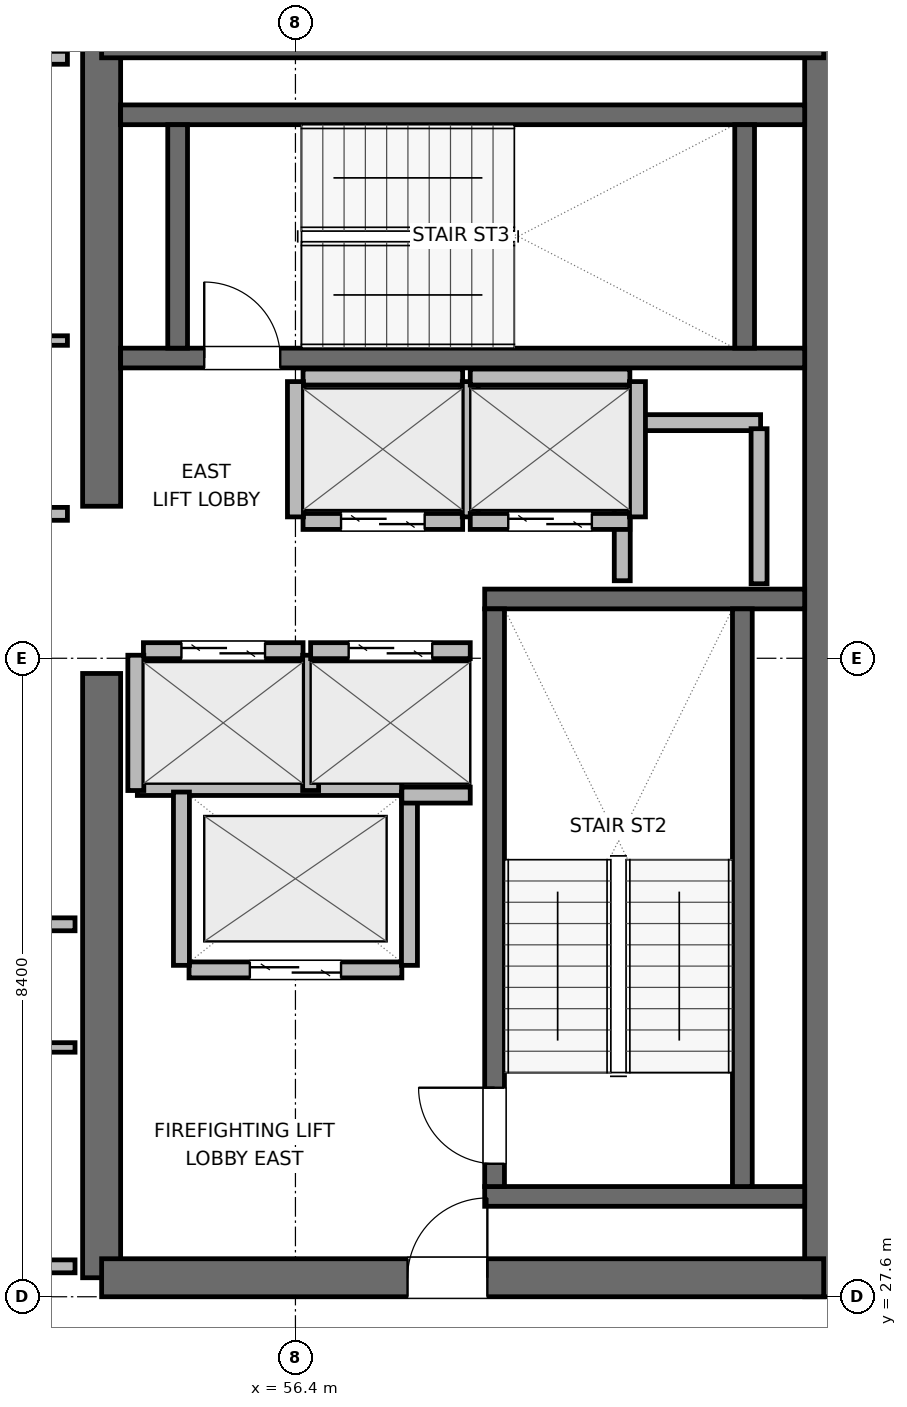
"""IFC4 building model, lengths in metres.
Left out: names, types, materials, properties, quantities, classifications, styles, units other than length and angle.
Written with IfcOpenShell. Run it as: python <this file> out.ifc"""

import sys

from ifc_helpers import new_model, si_unit, direction, frame, frame_2d, origin, place, context, subcontext, project, spatial, rectangle, extrude, element, fill, save


model = new_model("IFC4")
c1 = context("Model", 3, precision=1e-05, world=origin(), true_north=direction((0.0, 1.0)))
c2 = subcontext(c1, "Body", "Model", "MODEL_VIEW")
j1 = project(units=[si_unit("LENGTHUNIT", "METRE"), si_unit("PLANEANGLEUNIT", "RADIAN")], contexts=[c1])
p1 = place(None, origin())
s1 = spatial("IfcSite", under=j1, at=p1, CompositionType="ELEMENT")
p2 = place(p1, origin())
s2 = spatial("IfcBuilding", under=s1, at=p2, CompositionType="ELEMENT")
p3 = place(p2, frame((0.0, 0.0, 278.4)))
s3 = spatial("IfcBuildingStorey", under=s2, at=p3, CompositionType="ELEMENT", Elevation=278.4)
p4 = place(p3, frame((53.85, 27.85, 0.0), z_axis=(0.0, 0.0, 1.0), x_axis=(0.0, 1.0, 0.0)))
e1 = element("IfcWall", 1, at=p4, inside=s3, PredefinedType="SHEAR", context=c2, shape_type="SweptSolid", body=[
    extrude(rectangle(XDim=7.95, YDim=0.5, at=frame_2d((3.975, 0.0))), origin(), (0.0, 0.0, 1.0), 3.9),
])
p5 = place(p3, frame((53.85, 38.0, 0.0), z_axis=(0.0, 0.0, 1.0), x_axis=(0.0, 1.0, 0.0)))
e2 = element("IfcWall", 2, at=p5, inside=s3, PredefinedType="SHEAR", context=c2, shape_type="SweptSolid", body=[
    extrude(rectangle(XDim=6.15, YDim=0.5, at=frame_2d((3.075, 0.0))), origin(), (0.0, 0.0, 1.0), 3.9),
])
p6 = place(p3, frame((63.35, 27.6, 0.0), z_axis=(0.0, 0.0, 1.0), x_axis=(0.0, 1.0, 0.0)))
e3 = element("IfcWall", 3, at=p6, inside=s3, PredefinedType="SHEAR", context=c2, shape_type="SweptSolid", body=[
    extrude(rectangle(XDim=16.8, YDim=0.5, at=frame_2d((8.4, 0.0))), origin(), (0.0, 0.0, 1.0), 3.9),
])
p7 = place(p3, frame((53.85, 27.85, 0.0), z_axis=(0.0, 0.0, 1.0), x_axis=(1.0, 0.0, 0.0)))
e4 = element("IfcWall", 4, at=p7, inside=s3, PredefinedType="SHEAR", context=c2, shape_type="SweptSolid", body=[
    extrude(rectangle(XDim=9.5, YDim=0.5, at=frame_2d((4.75, 0.0))), origin(), (0.0, 0.0, 1.0), 3.9),
])
p8 = place(p7, frame((4.025, 0.0, 0.0)))
e5 = element("IfcOpeningElement", 5, at=p8, cuts=e4, PredefinedType="OPENING", context=c2, shape_type="SweptSolid", body=[
    extrude(rectangle(XDim=1.05, YDim=2.04, at=frame_2d((0.525, 1.02))), frame((0.0, 0.26, 0.0), z_axis=(0.0, -1.0, 0.0), x_axis=(1.0, 0.0, 0.0)), (0.0, 0.0, 1.0), 0.52),
])
p9 = place(p3, frame((53.85, 44.15, 0.0), z_axis=(0.0, 0.0, 1.0), x_axis=(1.0, 0.0, 0.0)))
e6 = element("IfcWall", 6, at=p9, inside=s3, PredefinedType="SHEAR", context=c2, shape_type="SweptSolid", body=[
    extrude(rectangle(XDim=9.5, YDim=0.5, at=frame_2d((4.75, 0.0))), origin(), (0.0, 0.0, 1.0), 3.9),
])
for number, where, z_axis, x_axis in (
    (7, (58.89, 28.92, 0.0), (0.0, 0.0, 1.0), (1.0, 0.0, 0.0)),
    (8, (58.89, 36.78, 0.0), (0.0, 0.0, 1.0), (1.0, 0.0, 0.0)),
):
    element("IfcWall", number, at=place(p3, frame(where, z_axis=z_axis, x_axis=x_axis)), inside=s3, PredefinedType="SHEAR", context=c2, shape_type="SweptSolid", body=[
        extrude(rectangle(XDim=4.21, YDim=0.26, at=frame_2d((2.105, 0.0))), origin(), (0.0, 0.0, 1.0), 3.9),
    ])
p10 = place(p3, frame((59.02, 29.05, 0.0), z_axis=(0.0, 0.0, 1.0), x_axis=(0.0, 1.0, 0.0)))
e9 = element("IfcWall", 9, at=p10, inside=s3, PredefinedType="SHEAR", context=c2, shape_type="SweptSolid", body=[
    extrude(rectangle(XDim=7.6, YDim=0.26, at=frame_2d((3.8, 0.0))), origin(), (0.0, 0.0, 1.0), 3.9),
])
p11 = place(p10, frame((0.3, 0.0, 0.0)))
e10 = element("IfcOpeningElement", 10, at=p11, cuts=e9, PredefinedType="OPENING", context=c2, shape_type="SweptSolid", body=[
    extrude(rectangle(XDim=1.0, YDim=2.04, at=frame_2d((0.5, 1.02))), frame((0.0, 0.14, 0.0), z_axis=(0.0, -1.0, 0.0), x_axis=(1.0, 0.0, 0.0)), (0.0, 0.0, 1.0), 0.28),
])
p12 = place(p3, frame((62.28, 29.05, 0.0), z_axis=(0.0, 0.0, 1.0), x_axis=(0.0, 1.0, 0.0)))
e11 = element("IfcWall", 11, at=p12, inside=s3, PredefinedType="SHEAR", context=c2, shape_type="SweptSolid", body=[
    extrude(rectangle(XDim=7.6, YDim=0.26, at=frame_2d((3.8, 0.0))), origin(), (0.0, 0.0, 1.0), 3.9),
])
p13 = place(p3, frame((54.1, 39.95, 0.0), z_axis=(0.0, 0.0, 1.0), x_axis=(1.0, 0.0, 0.0)))
e12 = element("IfcWall", 12, at=p13, inside=s3, PredefinedType="SHEAR", context=c2, shape_type="SweptSolid", body=[
    extrude(rectangle(XDim=9.0, YDim=0.26, at=frame_2d((4.5, 0.0))), origin(), (0.0, 0.0, 1.0), 3.9),
])
p14 = place(p13, frame((1.1, 0.0, 0.0)))
e13 = element("IfcOpeningElement", 13, at=p14, cuts=e12, PredefinedType="OPENING", context=c2, shape_type="SweptSolid", body=[
    extrude(rectangle(XDim=1.0, YDim=2.04, at=frame_2d((0.5, 1.02))), frame((0.0, 0.14, 0.0), z_axis=(0.0, -1.0, 0.0), x_axis=(1.0, 0.0, 0.0)), (0.0, 0.0, 1.0), 0.28),
])
p15 = place(p3, frame((54.1, 43.15, 0.0), z_axis=(0.0, 0.0, 1.0), x_axis=(1.0, 0.0, 0.0)))
e14 = element("IfcWall", 14, at=p15, inside=s3, PredefinedType="SHEAR", context=c2, shape_type="SweptSolid", body=[
    extrude(rectangle(XDim=9.0, YDim=0.26, at=frame_2d((4.5, 0.0))), origin(), (0.0, 0.0, 1.0), 3.9),
])
for number, where, z_axis, x_axis in (
    (15, (54.85, 40.08, 0.0), (0.0, 0.0, 1.0), (0.0, 1.0, 0.0)),
    (16, (62.31, 40.08, 0.0), (0.0, 0.0, 1.0), (0.0, 1.0, 0.0)),
):
    element("IfcWall", number, at=place(p3, frame(where, z_axis=z_axis, x_axis=x_axis)), inside=s3, PredefinedType="SHEAR", context=c2, shape_type="SweptSolid", body=[
        extrude(rectangle(XDim=2.94, YDim=0.26, at=frame_2d((1.47, 0.0))), origin(), (0.0, 0.0, 1.0), 3.9),
    ])
p16 = place(p3, frame((60.72, 39.1, 0.0), z_axis=(0.0, 0.0, 1.0), x_axis=(1.0, 0.0, 0.0)))
e17 = element("IfcWall", 17, at=p16, inside=s3, PredefinedType="PARTITIONING", context=c2, shape_type="SweptSolid", body=[
    extrude(rectangle(XDim=1.8, YDim=0.21, at=frame_2d((0.9, 0.0))), origin(), (0.0, 0.0, 1.0), 3.6),
])
p17 = place(p3, frame((60.7, 37.02, 0.0), z_axis=(0.0, 0.0, 1.0), x_axis=(0.0, 1.0, 0.0)))
e18 = element("IfcWall", 18, at=p17, inside=s3, PredefinedType="PARTITIONING", context=c2, shape_type="SweptSolid", body=[
    extrude(rectangle(XDim=1.96, YDim=0.21, at=frame_2d((0.98, 0.0))), origin(), (0.0, 0.0, 1.0), 3.6),
])
p18 = place(p3, frame((62.5, 36.98, 0.0), z_axis=(0.0, 0.0, 1.0), x_axis=(0.0, 1.0, 0.0)))
e19 = element("IfcWall", 19, at=p18, inside=s3, PredefinedType="PARTITIONING", context=c2, shape_type="SweptSolid", body=[
    extrude(rectangle(XDim=2.04, YDim=0.21, at=frame_2d((1.02, 0.0))), origin(), (0.0, 0.0, 1.0), 3.6),
])
p19 = place(p3, frame((55.0, 31.9, 0.0), z_axis=(0.0, 0.0, 1.0), x_axis=(1.0, 0.0, 0.0)))
e20 = element("IfcWall", 20, at=p19, inside=s3, PredefinedType="PARTITIONING", context=c2, shape_type="SweptSolid", body=[
    extrude(rectangle(XDim=2.8, YDim=0.21, at=frame_2d((1.4, 0.0))), origin(), (0.0, 0.0, 1.0), 3.6),
])
p20 = place(p19, frame((0.8, 0.0, 0.0)))
e21 = element("IfcOpeningElement", 21, at=p20, cuts=e20, PredefinedType="OPENING", context=c2, shape_type="SweptSolid", body=[
    extrude(rectangle(XDim=1.2, YDim=2.04, at=frame_2d((0.6, 1.02))), frame((0.0, 0.115, 0.0), z_axis=(0.0, -1.0, 0.0), x_axis=(1.0, 0.0, 0.0)), (0.0, 0.0, 1.0), 0.23),
])
p21 = place(p3, frame((54.32, 34.3, 0.0), z_axis=(0.0, 0.0, 1.0), x_axis=(1.0, 0.0, 0.0)))
e22 = element("IfcWall", 22, at=p21, inside=s3, PredefinedType="PARTITIONING", context=c2, shape_type="SweptSolid", body=[
    extrude(rectangle(XDim=3.48, YDim=0.21, at=frame_2d((1.74, 0.0))), origin(), (0.0, 0.0, 1.0), 3.6),
])
for number, where, z_axis, x_axis in (
    (23, (54.9, 31.96, 0.0), (0.0, 0.0, 1.0), (0.0, 1.0, 0.0)),
    (24, (57.9, 31.96, 0.0), (0.0, 0.0, 1.0), (0.0, 1.0, 0.0)),
):
    element("IfcWall", number, at=place(p3, frame(where, z_axis=z_axis, x_axis=x_axis)), inside=s3, PredefinedType="PARTITIONING", context=c2, shape_type="SweptSolid", body=[
        extrude(rectangle(XDim=2.28, YDim=0.21, at=frame_2d((1.14, 0.0))), origin(), (0.0, 0.0, 1.0), 3.6),
    ])
p22 = place(p3, frame((54.4, 36.1, 0.0), z_axis=(0.0, 0.0, 1.0), x_axis=(1.0, 0.0, 0.0)))
e25 = element("IfcWall", 25, at=p22, inside=s3, PredefinedType="PARTITIONING", context=c2, shape_type="SweptSolid", body=[
    extrude(rectangle(XDim=2.1, YDim=0.21, at=frame_2d((1.05, 0.0))), origin(), (0.0, 0.0, 1.0), 3.6),
])
p23 = place(p22, frame((0.5, 0.0, 0.0)))
e26 = element("IfcOpeningElement", 26, at=p23, cuts=e25, PredefinedType="OPENING", context=c2, shape_type="SweptSolid", body=[
    extrude(rectangle(XDim=1.1, YDim=2.04, at=frame_2d((0.55, 1.02))), frame((0.0, 0.115, 0.0), z_axis=(0.0, -1.0, 0.0), x_axis=(1.0, 0.0, 0.0)), (0.0, 0.0, 1.0), 0.23),
])
for number, where, z_axis, x_axis in (
    (27, (54.3, 34.26, 0.0), (0.0, 0.0, 1.0), (0.0, 1.0, 0.0)),
    (28, (56.6, 34.26, 0.0), (0.0, 0.0, 1.0), (0.0, 1.0, 0.0)),
):
    element("IfcWall", number, at=place(p3, frame(where, z_axis=z_axis, x_axis=x_axis)), inside=s3, PredefinedType="PARTITIONING", context=c2, shape_type="SweptSolid", body=[
        extrude(rectangle(XDim=1.78, YDim=0.21, at=frame_2d((0.89, 0.0))), origin(), (0.0, 0.0, 1.0), 3.6),
    ])
p24 = place(p3, frame((56.6, 36.1, 0.0), z_axis=(0.0, 0.0, 1.0), x_axis=(1.0, 0.0, 0.0)))
e29 = element("IfcWall", 29, at=p24, inside=s3, PredefinedType="PARTITIONING", context=c2, shape_type="SweptSolid", body=[
    extrude(rectangle(XDim=2.1, YDim=0.21, at=frame_2d((1.05, 0.0))), origin(), (0.0, 0.0, 1.0), 3.6),
])
p25 = place(p24, frame((0.5, 0.0, 0.0)))
e30 = element("IfcOpeningElement", 30, at=p25, cuts=e29, PredefinedType="OPENING", context=c2, shape_type="SweptSolid", body=[
    extrude(rectangle(XDim=1.1, YDim=2.04, at=frame_2d((0.55, 1.02))), frame((0.0, 0.115, 0.0), z_axis=(0.0, -1.0, 0.0), x_axis=(1.0, 0.0, 0.0)), (0.0, 0.0, 1.0), 0.23),
])
p26 = place(p3, frame((57.8, 34.2, 0.0), z_axis=(0.0, 0.0, 1.0), x_axis=(1.0, 0.0, 0.0)))
e31 = element("IfcWall", 31, at=p26, inside=s3, PredefinedType="PARTITIONING", context=c2, shape_type="SweptSolid", body=[
    extrude(rectangle(XDim=0.9, YDim=0.21, at=frame_2d((0.45, 0.0))), origin(), (0.0, 0.0, 1.0), 3.6),
])
p27 = place(p3, frame((56.5, 37.8, 0.0), z_axis=(0.0, 0.0, 1.0), x_axis=(1.0, 0.0, 0.0)))
e32 = element("IfcWall", 32, at=p27, inside=s3, PredefinedType="PARTITIONING", context=c2, shape_type="SweptSolid", body=[
    extrude(rectangle(XDim=2.1, YDim=0.21, at=frame_2d((1.05, 0.0))), origin(), (0.0, 0.0, 1.0), 3.6),
])
p28 = place(p27, frame((0.5, 0.0, 0.0)))
e33 = element("IfcOpeningElement", 33, at=p28, cuts=e32, PredefinedType="OPENING", context=c2, shape_type="SweptSolid", body=[
    extrude(rectangle(XDim=1.1, YDim=2.04, at=frame_2d((0.55, 1.02))), frame((0.0, 0.115, 0.0), z_axis=(0.0, -1.0, 0.0), x_axis=(1.0, 0.0, 0.0)), (0.0, 0.0, 1.0), 0.23),
])
p29 = place(p3, frame((56.5, 39.7, 0.0), z_axis=(0.0, 0.0, 1.0), x_axis=(1.0, 0.0, 0.0)))
e34 = element("IfcWall", 34, at=p29, inside=s3, PredefinedType="PARTITIONING", context=c2, shape_type="SweptSolid", body=[
    extrude(rectangle(XDim=2.1, YDim=0.21, at=frame_2d((1.05, 0.0))), origin(), (0.0, 0.0, 1.0), 3.6),
])
for number, where, z_axis, x_axis in (
    (35, (56.4, 37.86, 0.0), (0.0, 0.0, 1.0), (0.0, 1.0, 0.0)),
    (36, (58.7, 37.86, 0.0), (0.0, 0.0, 1.0), (0.0, 1.0, 0.0)),
):
    element("IfcWall", number, at=place(p3, frame(where, z_axis=z_axis, x_axis=x_axis)), inside=s3, PredefinedType="PARTITIONING", context=c2, shape_type="SweptSolid", body=[
        extrude(rectangle(XDim=1.78, YDim=0.21, at=frame_2d((0.89, 0.0))), origin(), (0.0, 0.0, 1.0), 3.6),
    ])
p30 = place(p3, frame((58.7, 37.8, 0.0), z_axis=(0.0, 0.0, 1.0), x_axis=(1.0, 0.0, 0.0)))
e37 = element("IfcWall", 37, at=p30, inside=s3, PredefinedType="PARTITIONING", context=c2, shape_type="SweptSolid", body=[
    extrude(rectangle(XDim=2.1, YDim=0.21, at=frame_2d((1.05, 0.0))), origin(), (0.0, 0.0, 1.0), 3.6),
])
p31 = place(p30, frame((0.5, 0.0, 0.0)))
e38 = element("IfcOpeningElement", 38, at=p31, cuts=e37, PredefinedType="OPENING", context=c2, shape_type="SweptSolid", body=[
    extrude(rectangle(XDim=1.1, YDim=2.04, at=frame_2d((0.55, 1.02))), frame((0.0, 0.115, 0.0), z_axis=(0.0, -1.0, 0.0), x_axis=(1.0, 0.0, 0.0)), (0.0, 0.0, 1.0), 0.23),
])
p32 = place(p3, frame((58.7, 39.7, 0.0), z_axis=(0.0, 0.0, 1.0), x_axis=(1.0, 0.0, 0.0)))
e39 = element("IfcWall", 39, at=p32, inside=s3, PredefinedType="PARTITIONING", context=c2, shape_type="SweptSolid", body=[
    extrude(rectangle(XDim=2.1, YDim=0.21, at=frame_2d((1.05, 0.0))), origin(), (0.0, 0.0, 1.0), 3.6),
])
p33 = place(p3, frame((60.9, 37.86, 0.0), z_axis=(0.0, 0.0, 1.0), x_axis=(0.0, 1.0, 0.0)))
e40 = element("IfcWall", 40, at=p33, inside=s3, PredefinedType="PARTITIONING", context=c2, shape_type="SweptSolid", body=[
    extrude(rectangle(XDim=1.78, YDim=0.21, at=frame_2d((0.89, 0.0))), origin(), (0.0, 0.0, 1.0), 3.6),
])
p34 = place(p3, frame((49.287, 28.0, 0.0), z_axis=(0.0, 0.0, 1.0), x_axis=(1.0, 0.0, 0.0)))
e41 = element("IfcWall", 41, at=p34, inside=s3, PredefinedType="PARTITIONING", context=c2, shape_type="SweptSolid", body=[
    extrude(rectangle(XDim=4.213, YDim=0.17, at=frame_2d((2.106, 0.0))), origin(), (0.0, 0.0, 1.0), 2.685),
])
p35 = place(p3, frame((52.2, 32.5, 0.0), z_axis=(0.0, 0.0, 1.0), x_axis=(1.0, 0.0, 0.0)))
e42 = element("IfcWall", 42, at=p35, inside=s3, PredefinedType="PARTITIONING", context=c2, shape_type="SweptSolid", body=[
    extrude(rectangle(XDim=1.3, YDim=0.17, at=frame_2d((0.65, 0.0))), origin(), (0.0, 0.0, 1.0), 3.6),
])
p36 = place(p3, frame((49.287, 30.88, 0.0), z_axis=(0.0, 0.0, 1.0), x_axis=(1.0, 0.0, 0.0)))
e43 = element("IfcWall", 43, at=p36, inside=s3, PredefinedType="PARTITIONING", context=c2, shape_type="SweptSolid", body=[
    extrude(rectangle(XDim=4.213, YDim=0.125, at=frame_2d((2.106, 0.0))), origin(), (0.0, 0.0, 1.0), 3.6),
])
p37 = place(p3, frame((49.287, 37.9, 0.0), z_axis=(0.0, 0.0, 1.0), x_axis=(1.0, 0.0, 0.0)))
e44 = element("IfcWall", 44, at=p37, inside=s3, PredefinedType="PARTITIONING", context=c2, shape_type="SweptSolid", body=[
    extrude(rectangle(XDim=4.113, YDim=0.17, at=frame_2d((2.056, 0.0))), origin(), (0.0, 0.0, 1.0), 3.6),
])
p38 = place(p3, frame((49.287, 43.9, 0.0), z_axis=(0.0, 0.0, 1.0), x_axis=(1.0, 0.0, 0.0)))
e45 = element("IfcWall", 45, at=p38, inside=s3, PredefinedType="PARTITIONING", context=c2, shape_type="SweptSolid", body=[
    extrude(rectangle(XDim=4.113, YDim=0.17, at=frame_2d((2.056, 0.0))), origin(), (0.0, 0.0, 1.0), 2.685),
])
p39 = place(p3, frame((49.287, 40.18, 0.0), z_axis=(0.0, 0.0, 1.0), x_axis=(1.0, 0.0, 0.0)))
e46 = element("IfcWall", 46, at=p39, inside=s3, PredefinedType="PARTITIONING", context=c2, shape_type="SweptSolid", body=[
    extrude(rectangle(XDim=4.113, YDim=0.125, at=frame_2d((2.056, 0.0))), origin(), (0.0, 0.0, 1.0), 3.6),
])
p40 = place(p11, origin())
e47 = element("IfcDoor", 47, at=p40, inside=s3, OperationType="SINGLE_SWING_RIGHT", PredefinedType="DOOR", context=c2, shape_type="SweptSolid", body=[
    extrude(rectangle(XDim=1.0, YDim=2.04, at=frame_2d((0.5, 1.02))), frame((0.0, 0.025, 0.0), z_axis=(0.0, -1.0, 0.0), x_axis=(1.0, 0.0, 0.0)), (0.0, 0.0, 1.0), 0.05),
])
fill(e10, e47)
p41 = place(p14, origin())
e48 = element("IfcDoor", 48, at=p41, inside=s3, OperationType="SINGLE_SWING_LEFT", PredefinedType="DOOR", context=c2, shape_type="SweptSolid", body=[
    extrude(rectangle(XDim=1.0, YDim=2.04, at=frame_2d((0.5, 1.02))), frame((0.0, 0.025, 0.0), z_axis=(0.0, -1.0, 0.0), x_axis=(1.0, 0.0, 0.0)), (0.0, 0.0, 1.0), 0.05),
])
fill(e13, e48)
p42 = place(p20, origin())
e49 = element("IfcDoor", 49, at=p42, inside=s3, OperationType="DOUBLE_DOOR_SLIDING", PredefinedType="DOOR", context=c2, shape_type="SweptSolid", body=[
    extrude(rectangle(XDim=1.2, YDim=2.04, at=frame_2d((0.6, 1.02))), frame((0.0, 0.025, 0.0), z_axis=(0.0, -1.0, 0.0), x_axis=(1.0, 0.0, 0.0)), (0.0, 0.0, 1.0), 0.05),
])
fill(e21, e49)
p43 = place(p23, origin())
e50 = element("IfcDoor", 50, at=p43, inside=s3, OperationType="DOUBLE_DOOR_SLIDING", PredefinedType="DOOR", context=c2, shape_type="SweptSolid", body=[
    extrude(rectangle(XDim=1.1, YDim=2.04, at=frame_2d((0.55, 1.02))), frame((0.0, 0.025, 0.0), z_axis=(0.0, -1.0, 0.0), x_axis=(1.0, 0.0, 0.0)), (0.0, 0.0, 1.0), 0.05),
])
fill(e26, e50)
p44 = place(p25, origin())
e51 = element("IfcDoor", 51, at=p44, inside=s3, OperationType="DOUBLE_DOOR_SLIDING", PredefinedType="DOOR", context=c2, shape_type="SweptSolid", body=[
    extrude(rectangle(XDim=1.1, YDim=2.04, at=frame_2d((0.55, 1.02))), frame((0.0, 0.025, 0.0), z_axis=(0.0, -1.0, 0.0), x_axis=(1.0, 0.0, 0.0)), (0.0, 0.0, 1.0), 0.05),
])
fill(e30, e51)
p45 = place(p28, origin())
e52 = element("IfcDoor", 52, at=p45, inside=s3, OperationType="DOUBLE_DOOR_SLIDING", PredefinedType="DOOR", context=c2, shape_type="SweptSolid", body=[
    extrude(rectangle(XDim=1.1, YDim=2.04, at=frame_2d((0.55, 1.02))), frame((0.0, 0.025, 0.0), z_axis=(0.0, -1.0, 0.0), x_axis=(1.0, 0.0, 0.0)), (0.0, 0.0, 1.0), 0.05),
])
fill(e33, e52)
p46 = place(p31, origin())
e53 = element("IfcDoor", 53, at=p46, inside=s3, OperationType="DOUBLE_DOOR_SLIDING", PredefinedType="DOOR", context=c2, shape_type="SweptSolid", body=[
    extrude(rectangle(XDim=1.1, YDim=2.04, at=frame_2d((0.55, 1.02))), frame((0.0, 0.025, 0.0), z_axis=(0.0, -1.0, 0.0), x_axis=(1.0, 0.0, 0.0)), (0.0, 0.0, 1.0), 0.05),
])
fill(e38, e53)
p47 = place(p8, origin())
e54 = element("IfcDoor", 54, at=p47, inside=s3, OperationType="SINGLE_SWING_RIGHT", PredefinedType="DOOR", context=c2, shape_type="SweptSolid", body=[
    extrude(rectangle(XDim=1.05, YDim=2.04, at=frame_2d((0.525, 1.02))), frame((0.0, 0.025, 0.0), z_axis=(0.0, -1.0, 0.0), x_axis=(1.0, 0.0, 0.0)), (0.0, 0.0, 1.0), 0.05),
])
fill(e5, e54)
save(model, sys.argv[1])
